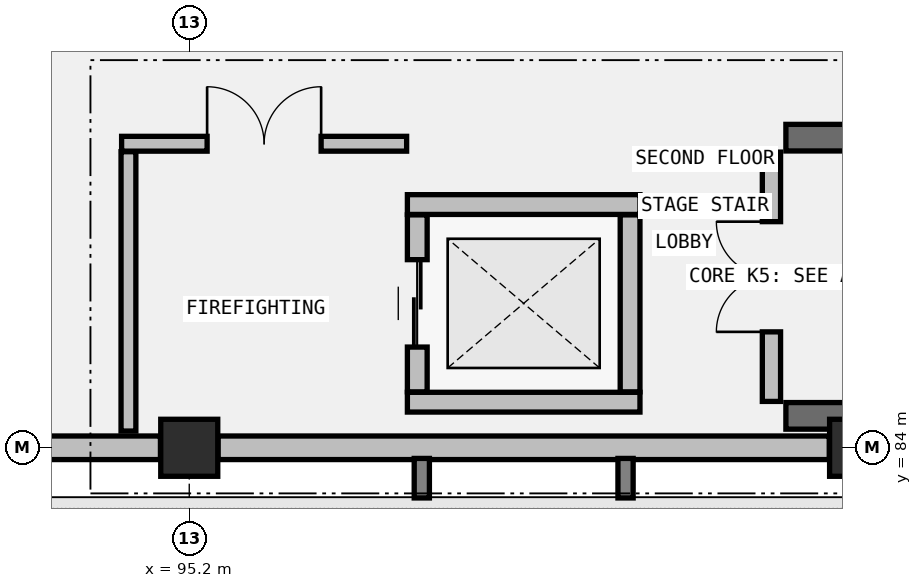
"""IFC4 building model, lengths in metres.
Left out: names, types, materials, properties, quantities, classifications, styles, units other than length and angle.
Written with IfcOpenShell. Run it as: python <this file> out.ifc"""

import sys

from ifc_helpers import new_model, si_unit, direction, frame, frame_2d, origin, origin_2d, place, context, subcontext, project, spatial, rectangle, extrude, element, fill, save


model = new_model("IFC4")
c1 = context("Model", 3, precision=1e-05, world=origin(), true_north=direction((0.0, 1.0)))
c2 = subcontext(c1, "Body", "Model", "MODEL_VIEW")
j1 = project(units=[si_unit("LENGTHUNIT", "METRE"), si_unit("PLANEANGLEUNIT", "RADIAN")], contexts=[c1])
p1 = place(None, origin())
s1 = spatial("IfcSite", under=j1, at=p1, CompositionType="ELEMENT")
p2 = place(p1, origin())
s2 = spatial("IfcBuilding", under=s1, at=p2, CompositionType="ELEMENT")
p3 = place(p2, frame((0.0, 0.0, 10.0)))
s3 = spatial("IfcBuildingStorey", under=s2, at=p3, CompositionType="ELEMENT", Elevation=10.0)
for number, where, z_axis, x_axis in (
    (1, (95.2, 84.0, 0.0), (0.0, 0.0, 1.0), (1.0, 0.0, 0.0)),
    (2, (104.0, 84.0, 0.0), (0.0, 0.0, 1.0), (1.0, 0.0, 0.0)),
):
    element("IfcColumn", number, at=place(p3, frame(where, z_axis=z_axis, x_axis=x_axis)), inside=s3, PredefinedType="COLUMN", context=c2, shape_type="SweptSolid", body=[
        extrude(rectangle(XDim=0.75, YDim=0.75, at=origin_2d()), origin(), (0.0, 0.0, 1.0), 4.6),
    ])
for number, where, z_axis, x_axis in (
    (3, (103.05, 84.42, 0.0), (0.0, 0.0, 1.0), (1.0, 0.0, 0.0)),
    (4, (111.2, 88.08, 0.0), (0.0, 0.0, 1.0), (-1.0, 0.0, 0.0)),
):
    element("IfcWall", number, at=place(p3, frame(where, z_axis=z_axis, x_axis=x_axis)), inside=s3, PredefinedType="SHEAR", context=c2, shape_type="SweptSolid", body=[
        extrude(rectangle(XDim=8.15, YDim=0.35, at=frame_2d((4.075, 0.0))), origin(), (0.0, 0.0, 1.0), 4.36),
    ])
p4 = place(p3, frame((86.804, 84.0, 0.0), z_axis=(0.0, 0.0, 1.0), x_axis=(1.0, 0.0, 0.0)))
e5 = element("IfcWall", 5, at=p4, inside=s3, PredefinedType="STANDARD", context=c2, shape_type="SweptSolid", body=[
    extrude(rectangle(XDim=8.017, YDim=0.31, at=frame_2d((4.009, 0.0))), origin(), (0.0, 0.0, 1.0), 3.528),
])
p5 = place(p3, frame((95.579, 84.0, 0.0), z_axis=(0.0, 0.0, 1.0), x_axis=(1.0, 0.0, 0.0)))
e6 = element("IfcWall", 6, at=p5, inside=s3, PredefinedType="STANDARD", context=c2, shape_type="SweptSolid", body=[
    extrude(rectangle(XDim=8.042, YDim=0.31, at=frame_2d((4.021, 0.0))), origin(), (0.0, 0.0, 1.0), 3.538),
])
p6 = place(p3, frame((102.86, 84.61, 0.0), z_axis=(0.0, 0.0, 1.0), x_axis=(0.0, 1.0, 0.0)))
e7 = element("IfcWall", 7, at=p6, inside=s3, PredefinedType="STANDARD", context=c2, shape_type="SweptSolid", body=[
    extrude(rectangle(XDim=3.28, YDim=0.24, at=frame_2d((1.64, 0.0))), origin(), (0.0, 0.0, 1.0), 4.36),
])
p7 = place(p6, frame((0.915, 0.0, 0.0)))
e8 = element("IfcOpeningElement", 8, at=p7, cuts=e7, PredefinedType="OPENING", context=c2, shape_type="SweptSolid", body=[
    extrude(rectangle(XDim=1.45, YDim=2.2, at=frame_2d((0.725, 1.1))), frame((0.0, 0.13, 0.0), z_axis=(0.0, -1.0, 0.0), x_axis=(1.0, 0.0, 0.0)), (0.0, 0.0, 1.0), 0.26),
])
for number, where, z_axis, x_axis in (
    (9, (98.07, 84.6, 0.0), (0.0, 0.0, 1.0), (1.0, 0.0, 0.0)),
    (10, (98.07, 87.2, 0.0), (0.0, 0.0, 1.0), (1.0, 0.0, 0.0)),
):
    element("IfcWall", number, at=place(p3, frame(where, z_axis=z_axis, x_axis=x_axis)), inside=s3, PredefinedType="STANDARD", context=c2, shape_type="SweptSolid", body=[
        extrude(rectangle(XDim=3.06, YDim=0.26, at=frame_2d((1.53, 0.0))), origin(), (0.0, 0.0, 1.0), 4.36),
    ])
p8 = place(p3, frame((98.2, 84.736, 0.0), z_axis=(0.0, 0.0, 1.0), x_axis=(0.0, 1.0, 0.0)))
e11 = element("IfcWall", 11, at=p8, inside=s3, PredefinedType="STANDARD", context=c2, shape_type="SweptSolid", body=[
    extrude(rectangle(XDim=2.328, YDim=0.26, at=frame_2d((1.164, 0.0))), origin(), (0.0, 0.0, 1.0), 4.36),
])
p9 = place(p8, frame((0.589, 0.0, 0.0)))
e12 = element("IfcOpeningElement", 12, at=p9, cuts=e11, PredefinedType="OPENING", context=c2, shape_type="SweptSolid", body=[
    extrude(rectangle(XDim=1.15, YDim=2.15, at=frame_2d((0.575, 1.075))), frame((0.0, 0.14, 0.0), z_axis=(0.0, -1.0, 0.0), x_axis=(1.0, 0.0, 0.0)), (0.0, 0.0, 1.0), 0.28),
])
p10 = place(p3, frame((101.0, 84.736, 0.0), z_axis=(0.0, 0.0, 1.0), x_axis=(0.0, 1.0, 0.0)))
e13 = element("IfcWall", 13, at=p10, inside=s3, PredefinedType="STANDARD", context=c2, shape_type="SweptSolid", body=[
    extrude(rectangle(XDim=2.328, YDim=0.26, at=frame_2d((1.164, 0.0))), origin(), (0.0, 0.0, 1.0), 4.36),
])
p11 = place(p3, frame((94.4, 84.22, 0.0), z_axis=(0.0, 0.0, 1.0), x_axis=(0.0, 1.0, 0.0)))
e14 = element("IfcWall", 14, at=p11, inside=s3, PredefinedType="PARTITIONING", context=c2, shape_type="SweptSolid", body=[
    extrude(rectangle(XDim=3.675, YDim=0.195, at=frame_2d((1.837, 0.0))), origin(), (0.0, 0.0, 1.0), 3.528),
])
p12 = place(p3, frame((94.31, 88.0, 0.0), z_axis=(0.0, 0.0, 1.0), x_axis=(1.0, 0.0, 0.0)))
e15 = element("IfcWall", 15, at=p12, inside=s3, PredefinedType="PARTITIONING", context=c2, shape_type="SweptSolid", body=[
    extrude(rectangle(XDim=3.75, YDim=0.195, at=frame_2d((1.875, 0.0))), origin(), (0.0, 0.0, 1.0), 4.36),
])
p13 = place(p12, frame((1.125, 0.0, 0.0)))
e16 = element("IfcOpeningElement", 16, at=p13, cuts=e15, PredefinedType="OPENING", context=c2, shape_type="SweptSolid", body=[
    extrude(rectangle(XDim=1.5, YDim=2.2, at=frame_2d((0.75, 1.1))), frame((0.0, 0.107, 0.0), z_axis=(0.0, -1.0, 0.0), x_axis=(1.0, 0.0, 0.0)), (0.0, 0.0, 1.0), 0.215),
])
p14 = place(p7, origin())
e17 = element("IfcDoor", 17, at=p14, inside=s3, OperationType="DOUBLE_DOOR_SINGLE_SWING", PredefinedType="DOOR", context=c2, shape_type="SweptSolid", body=[
    extrude(rectangle(XDim=1.45, YDim=2.2, at=frame_2d((0.725, 1.1))), frame((0.0, 0.025, 0.0), z_axis=(0.0, -1.0, 0.0), x_axis=(1.0, 0.0, 0.0)), (0.0, 0.0, 1.0), 0.05),
])
fill(e8, e17)
p15 = place(p9, origin())
e18 = element("IfcDoor", 18, at=p15, inside=s3, OperationType="SLIDING_TO_LEFT", PredefinedType="DOOR", context=c2, shape_type="SweptSolid", body=[
    extrude(rectangle(XDim=1.15, YDim=2.15, at=frame_2d((0.575, 1.075))), frame((0.0, 0.025, 0.0), z_axis=(0.0, -1.0, 0.0), x_axis=(1.0, 0.0, 0.0)), (0.0, 0.0, 1.0), 0.05),
])
fill(e12, e18)
p16 = place(p13, origin())
e19 = element("IfcDoor", 19, at=p16, inside=s3, OperationType="DOUBLE_DOOR_SINGLE_SWING", PredefinedType="DOOR", context=c2, shape_type="SweptSolid", body=[
    extrude(rectangle(XDim=1.5, YDim=2.2, at=frame_2d((0.75, 1.1))), frame((0.0, 0.025, 0.0), z_axis=(0.0, -1.0, 0.0), x_axis=(1.0, 0.0, 0.0)), (0.0, 0.0, 1.0), 0.05),
])
fill(e16, e19)
save(model, sys.argv[1])
